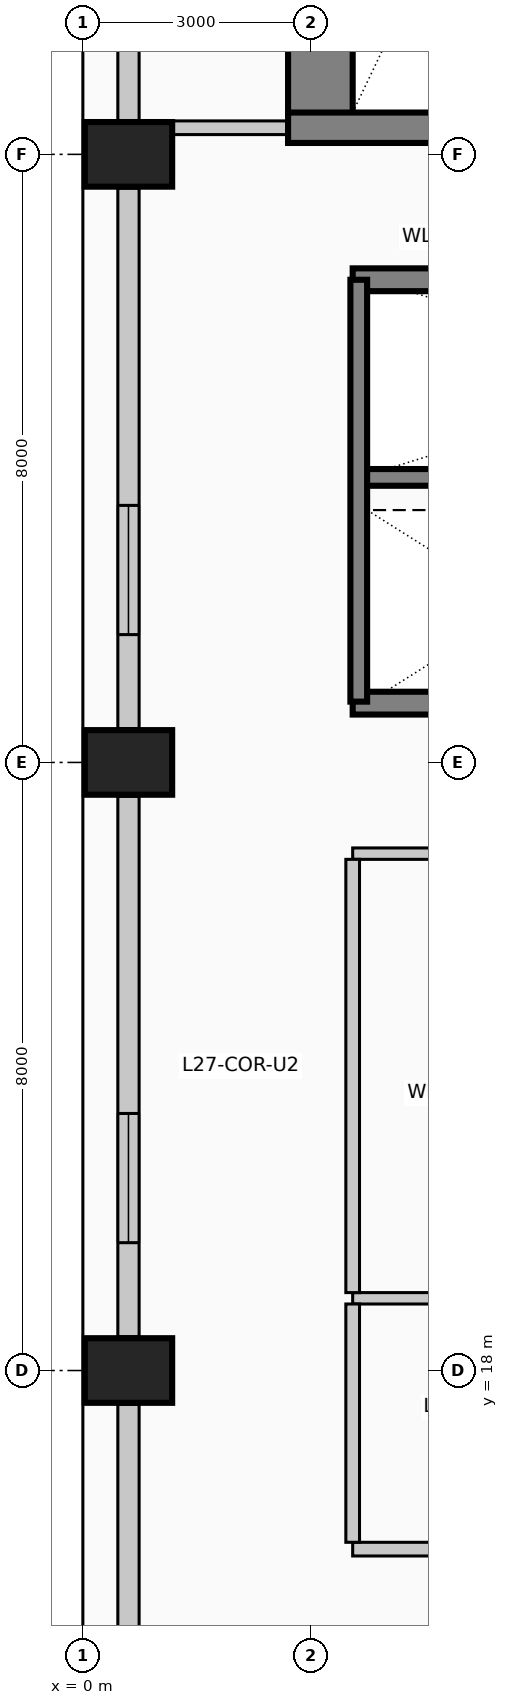
"""IFC4 building model, lengths in metres.
Left out: names, types, materials, properties, quantities, classifications, styles, units other than length and angle.
Written with IfcOpenShell. Run it as: python <this file> out.ifc"""

import sys

from ifc_helpers import new_model, si_unit, direction, frame, frame_2d, origin, origin_2d, place, context, subcontext, project, spatial, rectangle, extrude, element, fill, save


model = new_model("IFC4")
c1 = context("Model", 3, precision=1e-05, world=origin(), true_north=direction((0.0, 1.0)))
c2 = subcontext(c1, "Body", "Model", "MODEL_VIEW")
j1 = project(units=[si_unit("LENGTHUNIT", "METRE"), si_unit("PLANEANGLEUNIT", "RADIAN")], contexts=[c1])
p1 = place(None, origin())
s1 = spatial("IfcSite", under=j1, at=p1, CompositionType="ELEMENT")
p2 = place(p1, origin())
s2 = spatial("IfcBuilding", under=s1, at=p2, CompositionType="ELEMENT")
p3 = place(p2, frame((0.0, 0.0, 112.6)))
s3 = spatial("IfcBuildingStorey", under=s2, at=p3, CompositionType="ELEMENT", Elevation=112.6)
p4 = place(p3, frame((3.125, 34.15, 0.0), z_axis=(0.0, 0.0, 1.0), x_axis=(0.0, 1.0, 0.0)))
e1 = element("IfcWall", 1, at=p4, inside=s3, PredefinedType="SHEAR", context=c2, shape_type="SweptSolid", body=[
    extrude(rectangle(XDim=9.13, YDim=0.85, at=frame_2d((4.565, 0.0))), origin(), (0.0, 0.0, 1.0), 4.0),
])
p5 = place(p3, frame((2.7, 34.35, 0.0), z_axis=(0.0, 0.0, 1.0), x_axis=(1.0, 0.0, 0.0)))
e2 = element("IfcWall", 2, at=p5, inside=s3, PredefinedType="SHEAR", context=c2, shape_type="SweptSolid", body=[
    extrude(rectangle(XDim=5.01, YDim=0.4, at=frame_2d((2.505, 0.0))), origin(), (0.0, 0.0, 1.0), 4.0),
])
p6 = place(p5, frame((2.4, 0.0, 0.0)))
e3 = element("IfcOpeningElement", 3, at=p6, cuts=e2, PredefinedType="OPENING", context=c2, shape_type="SweptSolid", body=[
    extrude(rectangle(XDim=1.15, YDim=2.2, at=frame_2d((0.575, 1.1))), frame((0.0, 0.21, 0.0), z_axis=(0.0, -1.0, 0.0), x_axis=(1.0, 0.0, 0.0)), (0.0, 0.0, 1.0), 0.42),
])
for number, where, z_axis, x_axis in (
    (4, (0.6, 18.0, 0.0), (0.0, 0.0, 1.0), (0.0, 1.0, 0.0)),
    (5, (0.6, 26.0, 0.0), (0.0, 0.0, 1.0), (0.0, 1.0, 0.0)),
    (6, (0.6, 34.0, 0.0), (0.0, 0.0, 1.0), (0.0, 1.0, 0.0)),
):
    element("IfcColumn", number, at=place(p3, frame(where, z_axis=z_axis, x_axis=x_axis)), inside=s3, PredefinedType="COLUMN", context=c2, shape_type="SweptSolid", body=[
        extrude(rectangle(XDim=0.85, YDim=1.15, at=origin_2d()), origin(), (0.0, 0.0, 1.0), 4.0),
    ])
p7 = place(p3, frame((0.6, 10.445, 0.0), z_axis=(0.0, 0.0, 1.0), x_axis=(0.0, 1.0, 0.0)))
e7 = element("IfcWall", 7, at=p7, inside=s3, PredefinedType="SOLIDWALL", context=c2, shape_type="SweptSolid", body=[
    extrude(rectangle(XDim=7.11, YDim=0.28, at=frame_2d((3.555, 0.0))), origin(), (0.0, 0.0, 1.0), 2.875),
])
p8 = place(p3, frame((0.6, 18.445, 0.0), z_axis=(0.0, 0.0, 1.0), x_axis=(0.0, 1.0, 0.0)))
e8 = element("IfcWall", 8, at=p8, inside=s3, PredefinedType="SOLIDWALL", context=c2, shape_type="SweptSolid", body=[
    extrude(rectangle(XDim=7.11, YDim=0.28, at=frame_2d((3.555, 0.0))), origin(), (0.0, 0.0, 1.0), 2.875),
])
p9 = place(p8, frame((1.237, 0.0, 0.5)))
e9 = element("IfcOpeningElement", 9, at=p9, cuts=e8, PredefinedType="OPENING", context=c2, shape_type="SweptSolid", body=[
    extrude(rectangle(XDim=1.7, YDim=1.95, at=frame_2d((0.85, 0.975))), frame((0.0, 0.15, 0.0), z_axis=(0.0, -1.0, 0.0), x_axis=(1.0, 0.0, 0.0)), (0.0, 0.0, 1.0), 0.3),
])
p10 = place(p3, frame((0.6, 26.445, 0.0), z_axis=(0.0, 0.0, 1.0), x_axis=(0.0, 1.0, 0.0)))
e10 = element("IfcWall", 10, at=p10, inside=s3, PredefinedType="SOLIDWALL", context=c2, shape_type="SweptSolid", body=[
    extrude(rectangle(XDim=7.11, YDim=0.28, at=frame_2d((3.555, 0.0))), origin(), (0.0, 0.0, 1.0), 2.875),
])
p11 = place(p10, frame((1.237, 0.0, 0.5)))
e11 = element("IfcOpeningElement", 11, at=p11, cuts=e10, PredefinedType="OPENING", context=c2, shape_type="SweptSolid", body=[
    extrude(rectangle(XDim=1.7, YDim=1.95, at=frame_2d((0.85, 0.975))), frame((0.0, 0.15, 0.0), z_axis=(0.0, -1.0, 0.0), x_axis=(1.0, 0.0, 0.0)), (0.0, 0.0, 1.0), 0.3),
])
p12 = place(p3, frame((0.6, 34.445, 0.0), z_axis=(0.0, 0.0, 1.0), x_axis=(0.0, 1.0, 0.0)))
e12 = element("IfcWall", 12, at=p12, inside=s3, PredefinedType="SOLIDWALL", context=c2, shape_type="SweptSolid", body=[
    extrude(rectangle(XDim=7.51, YDim=0.28, at=frame_2d((3.755, 0.0))), origin(), (0.0, 0.0, 1.0), 2.875),
])
for number, where, z_axis, x_axis in (
    (13, (3.55, 32.35, 0.0), (0.0, 0.0, 1.0), (1.0, 0.0, 0.0)),
    (14, (5.65, 26.78, 0.0), (0.0, 0.0, 1.0), (-1.0, 0.0, 0.0)),
):
    element("IfcWall", number, at=place(p3, frame(where, z_axis=z_axis, x_axis=x_axis)), inside=s3, PredefinedType="SOLIDWALL", context=c2, shape_type="SweptSolid", body=[
        extrude(rectangle(XDim=2.1, YDim=0.3, at=frame_2d((1.05, 0.0))), origin(), (0.0, 0.0, 1.0), 4.0),
    ])
p13 = place(p3, frame((3.55, 29.75, 0.0), z_axis=(0.0, 0.0, 1.0), x_axis=(1.0, 0.0, 0.0)))
e15 = element("IfcWall", 15, at=p13, inside=s3, PredefinedType="SOLIDWALL", context=c2, shape_type="SweptSolid", body=[
    extrude(rectangle(XDim=8.65, YDim=0.22, at=frame_2d((4.325, 0.0))), origin(), (0.0, 0.0, 1.0), 4.0),
])
p14 = place(p3, frame((3.63, 26.8, 0.0), z_axis=(0.0, 0.0, 1.0), x_axis=(0.0, 1.0, 0.0)))
e16 = element("IfcWall", 16, at=p14, inside=s3, PredefinedType="SOLIDWALL", context=c2, shape_type="SweptSolid", body=[
    extrude(rectangle(XDim=5.55, YDim=0.22, at=frame_2d((2.775, 0.0))), origin(), (0.0, 0.0, 1.0), 4.0),
])
p15 = place(p3, frame((3.55, 15.65, 0.0), z_axis=(0.0, 0.0, 1.0), x_axis=(1.0, 0.0, 0.0)))
e17 = element("IfcWall", 17, at=p15, inside=s3, PredefinedType="PARTITIONING", context=c2, shape_type="SweptSolid", body=[
    extrude(rectangle(XDim=3.25, YDim=0.18, at=frame_2d((1.625, 0.0))), origin(), (0.0, 0.0, 1.0), 3.725),
])
p16 = place(p15, frame((1.15, 0.0, 0.0)))
e18 = element("IfcOpeningElement", 18, at=p16, cuts=e17, PredefinedType="OPENING", context=c2, shape_type="SweptSolid", body=[
    extrude(rectangle(XDim=0.95, YDim=2.15, at=frame_2d((0.475, 1.075))), frame((0.0, 0.1, 0.0), z_axis=(0.0, -1.0, 0.0), x_axis=(1.0, 0.0, 0.0)), (0.0, 0.0, 1.0), 0.2),
])
p17 = place(p3, frame((3.55, 18.95, 0.0), z_axis=(0.0, 0.0, 1.0), x_axis=(1.0, 0.0, 0.0)))
e19 = element("IfcWall", 19, at=p17, inside=s3, PredefinedType="PARTITIONING", context=c2, shape_type="SweptSolid", body=[
    extrude(rectangle(XDim=3.25, YDim=0.15, at=frame_2d((1.625, 0.0))), origin(), (0.0, 0.0, 1.0), 3.725),
])
p18 = place(p3, frame((3.55, 24.8, 0.0), z_axis=(0.0, 0.0, 1.0), x_axis=(1.0, 0.0, 0.0)))
e20 = element("IfcWall", 20, at=p18, inside=s3, PredefinedType="PARTITIONING", context=c2, shape_type="SweptSolid", body=[
    extrude(rectangle(XDim=6.25, YDim=0.15, at=frame_2d((3.125, 0.0))), origin(), (0.0, 0.0, 1.0), 3.725),
])
p19 = place(p18, frame((2.65, 0.0, 0.0)))
e21 = element("IfcOpeningElement", 21, at=p19, cuts=e20, PredefinedType="OPENING", context=c2, shape_type="SweptSolid", body=[
    extrude(rectangle(XDim=0.95, YDim=2.15, at=frame_2d((0.475, 1.075))), frame((0.0, 0.085, 0.0), z_axis=(0.0, -1.0, 0.0), x_axis=(1.0, 0.0, 0.0)), (0.0, 0.0, 1.0), 0.17),
])
p20 = place(p3, frame((1.175, 34.35, 0.0), z_axis=(0.0, 0.0, 1.0), x_axis=(1.0, 0.0, 0.0)))
e22 = element("IfcWall", 22, at=p20, inside=s3, PredefinedType="PARTITIONING", context=c2, shape_type="SweptSolid", body=[
    extrude(rectangle(XDim=1.525, YDim=0.18, at=frame_2d((0.762, 0.0))), origin(), (0.0, 0.0, 1.0), 3.725),
])
p21 = place(p3, frame((3.55, 15.74, 0.0), z_axis=(0.0, 0.0, 1.0), x_axis=(0.0, 1.0, 0.0)))
e23 = element("IfcWall", 23, at=p21, inside=s3, PredefinedType="PARTITIONING", context=c2, shape_type="SweptSolid", body=[
    extrude(rectangle(XDim=3.135, YDim=0.18, at=frame_2d((1.567, 0.0))), origin(), (0.0, 0.0, 1.0), 3.725),
])
p22 = place(p3, frame((3.55, 19.025, 0.0), z_axis=(0.0, 0.0, 1.0), x_axis=(0.0, 1.0, 0.0)))
e24 = element("IfcWall", 24, at=p22, inside=s3, PredefinedType="PARTITIONING", context=c2, shape_type="SweptSolid", body=[
    extrude(rectangle(XDim=5.7, YDim=0.18, at=frame_2d((2.85, 0.0))), origin(), (0.0, 0.0, 1.0), 3.725),
])
p23 = place(p9, origin())
e25 = element("IfcWindow", 25, at=p23, inside=s3, PartitioningType="SINGLE_PANEL", PredefinedType="WINDOW", context=c2, shape_type="SweptSolid", body=[
    extrude(rectangle(XDim=1.7, YDim=1.95, at=frame_2d((0.85, 0.975))), frame((0.0, 0.03, 0.0), z_axis=(0.0, -1.0, 0.0), x_axis=(1.0, 0.0, 0.0)), (0.0, 0.0, 1.0), 0.06),
])
fill(e9, e25)
p24 = place(p11, origin())
e26 = element("IfcWindow", 26, at=p24, inside=s3, PartitioningType="SINGLE_PANEL", PredefinedType="WINDOW", context=c2, shape_type="SweptSolid", body=[
    extrude(rectangle(XDim=1.7, YDim=1.95, at=frame_2d((0.85, 0.975))), frame((0.0, 0.03, 0.0), z_axis=(0.0, -1.0, 0.0), x_axis=(1.0, 0.0, 0.0)), (0.0, 0.0, 1.0), 0.06),
])
fill(e11, e26)
save(model, sys.argv[1])
